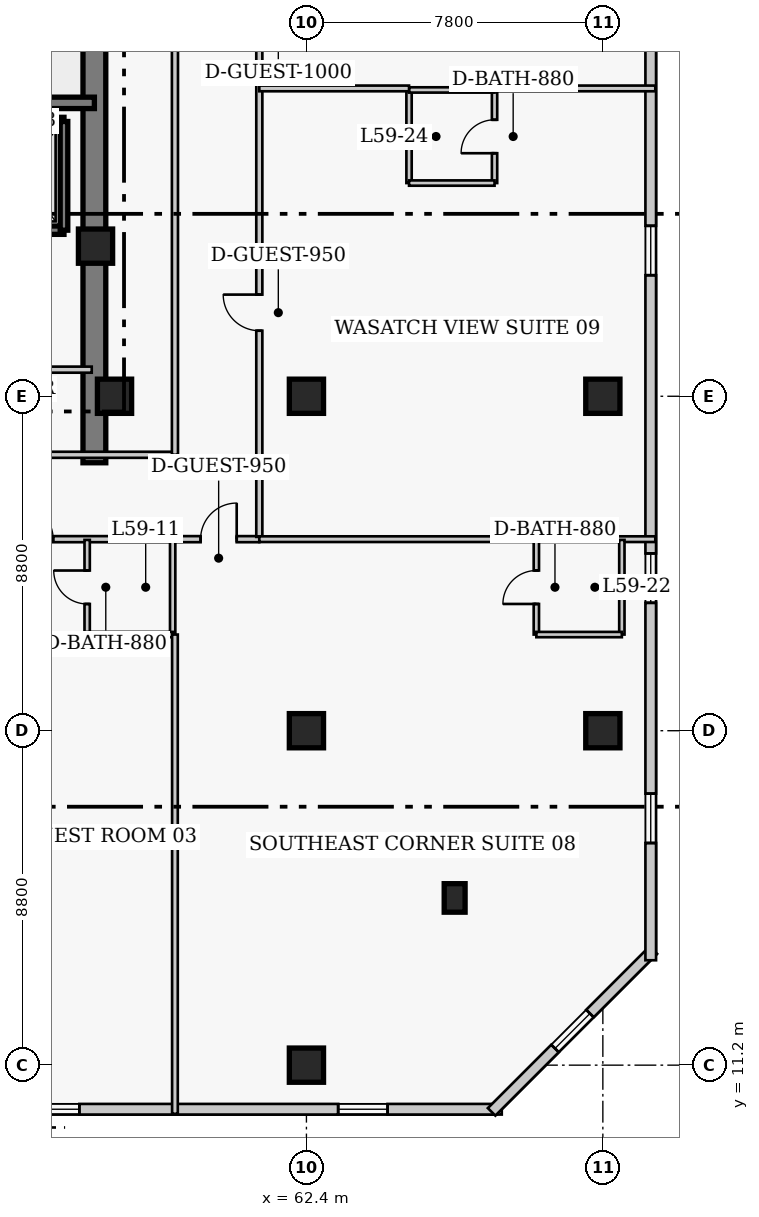
"""IFC4 building model, lengths in metres.
Left out: names, types, materials, properties, quantities, classifications, styles, units other than length and angle.
Written with IfcOpenShell. Run it as: python <this file> out.ifc"""

import sys

from ifc_helpers import new_model, si_unit, direction, frame, frame_2d, origin, origin_2d, place, context, subcontext, project, spatial, rectangle, extrude, element, fill, save


model = new_model("IFC4")
c1 = context("Model", 3, precision=1e-05, world=origin(), true_north=direction((0.0, 1.0)))
c2 = subcontext(c1, "Body", "Model", "MODEL_VIEW")
j1 = project(units=[si_unit("LENGTHUNIT", "METRE"), si_unit("PLANEANGLEUNIT", "RADIAN")], contexts=[c1])
p1 = place(None, origin())
s1 = spatial("IfcSite", under=j1, at=p1, CompositionType="ELEMENT")
p2 = place(p1, origin())
s2 = spatial("IfcBuilding", under=s1, at=p2, CompositionType="ELEMENT")
p3 = place(p2, frame((0.0, 0.0, 236.5)))
s3 = spatial("IfcBuildingStorey", under=s2, at=p3, CompositionType="ELEMENT", Elevation=236.5)
p4 = place(p3, frame((56.82, 27.05, 0.0), z_axis=(0.0, 0.0, 1.0), x_axis=(0.0, 1.0, 0.0)))
e1 = element("IfcWall", 1, at=p4, inside=s3, PredefinedType="SHEAR", context=c2, shape_type="SweptSolid", body=[
    extrude(rectangle(XDim=13.57, YDim=0.6, at=frame_2d((6.785, 0.0))), origin(), (0.0, 0.0, 1.0), 3.9),
])
p5 = place(p3, frame((48.45, 36.52, 0.0), z_axis=(0.0, 0.0, 1.0), x_axis=(1.0, 0.0, 0.0)))
e2 = element("IfcWall", 2, at=p5, inside=s3, PredefinedType="SHEAR", context=c2, shape_type="SweptSolid", body=[
    extrude(rectangle(XDim=8.37, YDim=0.3, at=frame_2d((4.185, 0.0))), origin(), (0.0, 0.0, 1.0), 3.9),
])
for number, where, z_axis, x_axis in (
    (3, (62.4, 11.2, 0.0), (0.0, 0.0, 1.0), (1.0, 0.0, 0.0)),
    (4, (62.4, 20.0, 0.0), (0.0, 0.0, 1.0), (1.0, 0.0, 0.0)),
    (5, (62.4, 28.8, 0.0), (0.0, 0.0, 1.0), (1.0, 0.0, 0.0)),
    (6, (70.2, 20.0, 0.0), (0.0, 0.0, 1.0), (1.0, 0.0, 0.0)),
    (7, (70.2, 28.8, 0.0), (0.0, 0.0, 1.0), (1.0, 0.0, 0.0)),
    (8, (57.35, 28.8, 0.0), (0.0, 0.0, 1.0), (1.0, 0.0, 0.0)),
    (9, (56.85, 32.75, 0.0), (0.0, 0.0, 1.0), (1.0, 0.0, 0.0)),
):
    element("IfcColumn", number, at=place(p3, frame(where, z_axis=z_axis, x_axis=x_axis)), inside=s3, PredefinedType="COLUMN", context=c2, shape_type="SweptSolid", body=[
        extrude(rectangle(XDim=0.9, YDim=0.9, at=origin_2d()), origin(), (0.0, 0.0, 1.0), 3.9),
    ])
p6 = place(p3, frame((66.3, 15.6, 0.0), z_axis=(0.0, 0.0, 1.0), x_axis=(1.0, 0.0, 0.0)))
e10 = element("IfcColumn", 10, at=p6, inside=s3, PredefinedType="PILASTER", context=c2, shape_type="SweptSolid", body=[
    extrude(rectangle(XDim=0.55, YDim=0.75, at=origin_2d()), origin(), (0.0, 0.0, 1.0), 3.9),
])
p7 = place(p3, frame((41.71, 10.04, 0.0), z_axis=(0.0, 0.0, 1.0), x_axis=(1.0, 0.0, 0.0)))
e11 = element("IfcWall", 11, at=p7, inside=s3, PredefinedType="SOLIDWALL", context=c2, shape_type="SweptSolid", body=[
    extrude(rectangle(XDim=25.83, YDim=0.28, at=frame_2d((12.915, 0.0))), origin(), (0.0, 0.0, 1.0), 3.52),
])
p8 = place(p7, frame((3.005, 0.0, 0.85)))
e12 = element("IfcOpeningElement", 12, at=p8, cuts=e11, PredefinedType="OPENING", context=c2, shape_type="SweptSolid", body=[
    extrude(rectangle(XDim=1.3, YDim=1.7, at=frame_2d((0.65, 0.85))), frame((0.0, 0.15, 0.0), z_axis=(0.0, -1.0, 0.0), x_axis=(1.0, 0.0, 0.0)), (0.0, 0.0, 1.0), 0.3),
])
p9 = place(p7, frame((13.415, 0.0, 0.85)))
e13 = element("IfcOpeningElement", 13, at=p9, cuts=e11, PredefinedType="OPENING", context=c2, shape_type="SweptSolid", body=[
    extrude(rectangle(XDim=1.3, YDim=1.7, at=frame_2d((0.65, 0.85))), frame((0.0, 0.15, 0.0), z_axis=(0.0, -1.0, 0.0), x_axis=(1.0, 0.0, 0.0)), (0.0, 0.0, 1.0), 0.3),
])
p10 = place(p7, frame((21.525, 0.0, 0.85)))
e14 = element("IfcOpeningElement", 14, at=p10, cuts=e11, PredefinedType="OPENING", context=c2, shape_type="SweptSolid", body=[
    extrude(rectangle(XDim=1.3, YDim=1.7, at=frame_2d((0.65, 0.85))), frame((0.0, 0.15, 0.0), z_axis=(0.0, -1.0, 0.0), x_axis=(1.0, 0.0, 0.0)), (0.0, 0.0, 1.0), 0.3),
])
p11 = place(p7, frame((8.83, 0.0, 0.85)))
e15 = element("IfcOpeningElement", 15, at=p11, cuts=e11, PredefinedType="OPENING", context=c2, shape_type="SweptSolid", body=[
    extrude(rectangle(XDim=1.3, YDim=1.7, at=frame_2d((0.65, 0.85))), frame((0.0, 0.15, 0.0), z_axis=(0.0, -1.0, 0.0), x_axis=(1.0, 0.0, 0.0)), (0.0, 0.0, 1.0), 0.3),
])
p12 = place(p3, frame((67.273, 9.971, 0.0), z_axis=(0.0, 0.0, 1.0), x_axis=(0.707106781187, 0.707106781187, 0.0)))
e16 = element("IfcWall", 16, at=p12, inside=s3, PredefinedType="SOLIDWALL", context=c2, shape_type="SweptSolid", body=[
    extrude(rectangle(XDim=6.02, YDim=0.28, at=frame_2d((3.01, 0.0))), origin(), (0.0, 0.0, 1.0), 3.52),
])
p13 = place(p12, frame((2.36, 0.0, 0.85)))
e17 = element("IfcOpeningElement", 17, at=p13, cuts=e16, PredefinedType="OPENING", context=c2, shape_type="SweptSolid", body=[
    extrude(rectangle(XDim=1.3, YDim=1.7, at=frame_2d((0.65, 0.85))), frame((0.0, 0.15, 0.0), z_axis=(0.0, -1.0, 0.0), x_axis=(1.0, 0.0, 0.0)), (0.0, 0.0, 1.0), 0.3),
])
p14 = place(p3, frame((71.46, 13.96, 0.0), z_axis=(0.0, 0.0, 1.0), x_axis=(0.0, 1.0, 0.0)))
e18 = element("IfcWall", 18, at=p14, inside=s3, PredefinedType="SOLIDWALL", context=c2, shape_type="SweptSolid", body=[
    extrude(rectangle(XDim=29.88, YDim=0.28, at=frame_2d((14.94, 0.0))), origin(), (0.0, 0.0, 1.0), 3.52),
])
p15 = place(p14, frame((3.085, 0.0, 0.85)))
e19 = element("IfcOpeningElement", 19, at=p15, cuts=e18, PredefinedType="OPENING", context=c2, shape_type="SweptSolid", body=[
    extrude(rectangle(XDim=1.3, YDim=1.7, at=frame_2d((0.65, 0.85))), frame((0.0, 0.15, 0.0), z_axis=(0.0, -1.0, 0.0), x_axis=(1.0, 0.0, 0.0)), (0.0, 0.0, 1.0), 0.3),
])
p16 = place(p14, frame((9.405, 0.0, 0.85)))
e20 = element("IfcOpeningElement", 20, at=p16, cuts=e18, PredefinedType="OPENING", context=c2, shape_type="SweptSolid", body=[
    extrude(rectangle(XDim=1.3, YDim=1.7, at=frame_2d((0.65, 0.85))), frame((0.0, 0.15, 0.0), z_axis=(0.0, -1.0, 0.0), x_axis=(1.0, 0.0, 0.0)), (0.0, 0.0, 1.0), 0.3),
])
p17 = place(p14, frame((18.025, 0.0, 0.85)))
e21 = element("IfcOpeningElement", 21, at=p17, cuts=e18, PredefinedType="OPENING", context=c2, shape_type="SweptSolid", body=[
    extrude(rectangle(XDim=1.3, YDim=1.7, at=frame_2d((0.65, 0.85))), frame((0.0, 0.15, 0.0), z_axis=(0.0, -1.0, 0.0), x_axis=(1.0, 0.0, 0.0)), (0.0, 0.0, 1.0), 0.3),
])
p18 = place(p14, frame((25.495, 0.0, 0.85)))
e22 = element("IfcOpeningElement", 22, at=p18, cuts=e18, PredefinedType="OPENING", context=c2, shape_type="SweptSolid", body=[
    extrude(rectangle(XDim=1.3, YDim=1.7, at=frame_2d((0.65, 0.85))), frame((0.0, 0.15, 0.0), z_axis=(0.0, -1.0, 0.0), x_axis=(1.0, 0.0, 0.0)), (0.0, 0.0, 1.0), 0.3),
])
p19 = place(p3, frame((53.6, 36.03, 0.0), z_axis=(0.0, 0.0, 1.0), x_axis=(1.0, 0.0, 0.0)))
e23 = element("IfcWall", 23, at=p19, inside=s3, PredefinedType="SHEAR", context=c2, shape_type="SweptSolid", body=[
    extrude(rectangle(XDim=2.42, YDim=0.22, at=frame_2d((1.21, 0.0))), origin(), (0.0, 0.0, 1.0), 3.9),
])
p20 = place(p3, frame((53.6, 33.17, 0.0), z_axis=(0.0, 0.0, 1.0), x_axis=(1.0, 0.0, 0.0)))
e24 = element("IfcWall", 24, at=p20, inside=s3, PredefinedType="SHEAR", context=c2, shape_type="SweptSolid", body=[
    extrude(rectangle(XDim=2.42, YDim=0.22, at=frame_2d((1.21, 0.0))), origin(), (0.0, 0.0, 1.0), 3.9),
])
p21 = place(p20, frame((0.65, 0.0, 0.0)))
e25 = element("IfcOpeningElement", 25, at=p21, cuts=e24, PredefinedType="OPENING", context=c2, shape_type="SweptSolid", body=[
    extrude(rectangle(XDim=1.3, YDim=2.15, at=frame_2d((0.65, 1.075))), frame((0.0, 0.12, 0.0), z_axis=(0.0, -1.0, 0.0), x_axis=(1.0, 0.0, 0.0)), (0.0, 0.0, 1.0), 0.24),
])
p22 = place(p3, frame((56.02, 33.17, 0.0), z_axis=(0.0, 0.0, 1.0), x_axis=(0.0, 1.0, 0.0)))
e26 = element("IfcWall", 26, at=p22, inside=s3, PredefinedType="SHEAR", context=c2, shape_type="SweptSolid", body=[
    extrude(rectangle(XDim=2.86, YDim=0.2, at=frame_2d((1.43, 0.0))), origin(), (0.0, 0.0, 1.0), 3.9),
])
p23 = place(p3, frame((51.12, 29.5, 0.0), z_axis=(0.0, 0.0, 1.0), x_axis=(1.0, 0.0, 0.0)))
e27 = element("IfcWall", 27, at=p23, inside=s3, PredefinedType="PARTITIONING", context=c2, shape_type="SweptSolid", body=[
    extrude(rectangle(XDim=5.63, YDim=0.16, at=frame_2d((2.815, 0.0))), origin(), (0.0, 0.0, 1.0), 3.52),
])
p24 = place(p3, frame((50.92, 27.26, 0.0), z_axis=(0.0, 0.0, 1.0), x_axis=(1.0, 0.0, 0.0)))
e28 = element("IfcWall", 28, at=p24, inside=s3, PredefinedType="PARTITIONING", context=c2, shape_type="SweptSolid", body=[
    extrude(rectangle(XDim=8.08, YDim=0.16, at=frame_2d((4.04, 0.0))), origin(), (0.0, 0.0, 1.0), 3.52),
])
p25 = place(p3, frame((35.8, 25.04, 0.0), z_axis=(0.0, 0.0, 1.0), x_axis=(1.0, 0.0, 0.0)))
e29 = element("IfcWall", 29, at=p25, inside=s3, PredefinedType="PARTITIONING", context=c2, shape_type="SweptSolid", body=[
    extrude(rectangle(XDim=25.36, YDim=0.16, at=frame_2d((12.68, 0.0))), origin(), (0.0, 0.0, 1.0), 3.52),
])
p26 = place(p25, frame((1.518, 0.0, 0.0)))
e30 = element("IfcOpeningElement", 30, at=p26, cuts=e29, PredefinedType="OPENING", context=c2, shape_type="SweptSolid", body=[
    extrude(rectangle(XDim=0.95, YDim=2.1, at=frame_2d((0.475, 1.05))), frame((0.0, 0.09, 0.0), z_axis=(0.0, -1.0, 0.0), x_axis=(1.0, 0.0, 0.0)), (0.0, 0.0, 1.0), 0.18),
])
p27 = place(p25, frame((9.278, 0.0, 0.0)))
e31 = element("IfcOpeningElement", 31, at=p27, cuts=e29, PredefinedType="OPENING", context=c2, shape_type="SweptSolid", body=[
    extrude(rectangle(XDim=1.0, YDim=2.15, at=frame_2d((0.5, 1.075))), frame((0.0, 0.09, 0.0), z_axis=(0.0, -1.0, 0.0), x_axis=(1.0, 0.0, 0.0)), (0.0, 0.0, 1.0), 0.18),
])
p28 = place(p25, frame((16.06, 0.0, 0.0)))
e32 = element("IfcOpeningElement", 32, at=p28, cuts=e29, PredefinedType="OPENING", context=c2, shape_type="SweptSolid", body=[
    extrude(rectangle(XDim=0.95, YDim=2.1, at=frame_2d((0.475, 1.05))), frame((0.0, 0.09, 0.0), z_axis=(0.0, -1.0, 0.0), x_axis=(1.0, 0.0, 0.0)), (0.0, 0.0, 1.0), 0.18),
])
p29 = place(p25, frame((18.985, 0.0, 0.0)))
e33 = element("IfcOpeningElement", 33, at=p29, cuts=e29, PredefinedType="OPENING", context=c2, shape_type="SweptSolid", body=[
    extrude(rectangle(XDim=0.95, YDim=2.1, at=frame_2d((0.475, 1.05))), frame((0.0, 0.09, 0.0), z_axis=(0.0, -1.0, 0.0), x_axis=(1.0, 0.0, 0.0)), (0.0, 0.0, 1.0), 0.18),
])
p30 = place(p25, frame((23.815, 0.0, 0.0)))
e34 = element("IfcOpeningElement", 34, at=p30, cuts=e29, PredefinedType="OPENING", context=c2, shape_type="SweptSolid", body=[
    extrude(rectangle(XDim=0.95, YDim=2.1, at=frame_2d((0.475, 1.05))), frame((0.0, 0.09, 0.0), z_axis=(0.0, -1.0, 0.0), x_axis=(1.0, 0.0, 0.0)), (0.0, 0.0, 1.0), 0.18),
])
p31 = place(p3, frame((61.16, 25.1, 0.0), z_axis=(0.0, 0.0, 1.0), x_axis=(0.0, 1.0, 0.0)))
e35 = element("IfcWall", 35, at=p31, inside=s3, PredefinedType="PARTITIONING", context=c2, shape_type="SweptSolid", body=[
    extrude(rectangle(XDim=15.55, YDim=0.16, at=frame_2d((7.775, 0.0))), origin(), (0.0, 0.0, 1.0), 3.52),
])
p32 = place(p31, frame((5.425, 0.0, 0.0)))
e36 = element("IfcOpeningElement", 36, at=p32, cuts=e35, PredefinedType="OPENING", context=c2, shape_type="SweptSolid", body=[
    extrude(rectangle(XDim=0.95, YDim=2.1, at=frame_2d((0.475, 1.05))), frame((0.0, 0.09, 0.0), z_axis=(0.0, -1.0, 0.0), x_axis=(1.0, 0.0, 0.0)), (0.0, 0.0, 1.0), 0.18),
])
p33 = place(p31, frame((14.11, 0.0, 0.0)))
e37 = element("IfcOpeningElement", 37, at=p33, cuts=e35, PredefinedType="OPENING", context=c2, shape_type="SweptSolid", body=[
    extrude(rectangle(XDim=1.0, YDim=2.15, at=frame_2d((0.5, 1.075))), frame((0.0, 0.09, 0.0), z_axis=(0.0, -1.0, 0.0), x_axis=(1.0, 0.0, 0.0)), (0.0, 0.0, 1.0), 0.18),
])
p34 = place(p3, frame((58.94, 27.26, 0.0), z_axis=(0.0, 0.0, 1.0), x_axis=(0.0, 1.0, 0.0)))
e38 = element("IfcWall", 38, at=p34, inside=s3, PredefinedType="PARTITIONING", context=c2, shape_type="SweptSolid", body=[
    extrude(rectangle(XDim=13.39, YDim=0.16, at=frame_2d((6.695, 0.0))), origin(), (0.0, 0.0, 1.0), 3.52),
])
p35 = place(p3, frame((56.63, 22.53, 0.0), z_axis=(0.0, 0.0, 1.0), x_axis=(0.0, 1.0, 0.0)))
e39 = element("IfcWall", 39, at=p35, inside=s3, PredefinedType="PLUMBINGWALL", context=c2, shape_type="SweptSolid", body=[
    extrude(rectangle(XDim=2.49, YDim=0.14, at=frame_2d((1.245, 0.0))), origin(), (0.0, 0.0, 1.0), 3.52),
])
p36 = place(p35, frame((0.805, 0.0, 0.0)))
e40 = element("IfcOpeningElement", 40, at=p36, cuts=e39, PredefinedType="OPENING", context=c2, shape_type="SweptSolid", body=[
    extrude(rectangle(XDim=0.88, YDim=2.05, at=frame_2d((0.44, 1.025))), frame((0.0, 0.08, 0.0), z_axis=(0.0, -1.0, 0.0), x_axis=(1.0, 0.0, 0.0)), (0.0, 0.0, 1.0), 0.16),
])
p37 = place(p3, frame((58.88, 22.53, 0.0), z_axis=(0.0, 0.0, 1.0), x_axis=(0.0, 1.0, 0.0)))
e41 = element("IfcWall", 41, at=p37, inside=s3, PredefinedType="PLUMBINGWALL", context=c2, shape_type="SweptSolid", body=[
    extrude(rectangle(XDim=2.49, YDim=0.14, at=frame_2d((1.245, 0.0))), origin(), (0.0, 0.0, 1.0), 3.52),
])
p38 = place(p3, frame((56.63, 22.53, 0.0), z_axis=(0.0, 0.0, 1.0), x_axis=(1.0, 0.0, 0.0)))
e42 = element("IfcWall", 42, at=p38, inside=s3, PredefinedType="PLUMBINGWALL", context=c2, shape_type="SweptSolid", body=[
    extrude(rectangle(XDim=2.25, YDim=0.14, at=frame_2d((1.125, 0.0))), origin(), (0.0, 0.0, 1.0), 3.52),
])
p39 = place(p3, frame((58.94, 9.92, 0.0), z_axis=(0.0, 0.0, 1.0), x_axis=(0.0, 1.0, 0.0)))
e43 = element("IfcWall", 43, at=p39, inside=s3, PredefinedType="PARTITIONING", context=c2, shape_type="SweptSolid", body=[
    extrude(rectangle(XDim=12.61, YDim=0.15, at=frame_2d((6.305, 0.0))), origin(), (0.0, 0.0, 1.0), 3.52),
])
p40 = place(p3, frame((61.16, 25.04, 0.0), z_axis=(0.0, 0.0, 1.0), x_axis=(1.0, 0.0, 0.0)))
e44 = element("IfcWall", 44, at=p40, inside=s3, PredefinedType="PARTITIONING", context=c2, shape_type="SweptSolid", body=[
    extrude(rectangle(XDim=10.42, YDim=0.15, at=frame_2d((5.21, 0.0))), origin(), (0.0, 0.0, 1.0), 3.52),
])
p41 = place(p3, frame((68.45, 22.53, 0.0), z_axis=(0.0, 0.0, 1.0), x_axis=(0.0, 1.0, 0.0)))
e45 = element("IfcWall", 45, at=p41, inside=s3, PredefinedType="PLUMBINGWALL", context=c2, shape_type="SweptSolid", body=[
    extrude(rectangle(XDim=2.49, YDim=0.14, at=frame_2d((1.245, 0.0))), origin(), (0.0, 0.0, 1.0), 3.52),
])
p42 = place(p41, frame((0.805, 0.0, 0.0)))
e46 = element("IfcOpeningElement", 46, at=p42, cuts=e45, PredefinedType="OPENING", context=c2, shape_type="SweptSolid", body=[
    extrude(rectangle(XDim=0.88, YDim=2.05, at=frame_2d((0.44, 1.025))), frame((0.0, 0.08, 0.0), z_axis=(0.0, -1.0, 0.0), x_axis=(1.0, 0.0, 0.0)), (0.0, 0.0, 1.0), 0.16),
])
p43 = place(p3, frame((70.7, 22.53, 0.0), z_axis=(0.0, 0.0, 1.0), x_axis=(0.0, 1.0, 0.0)))
e47 = element("IfcWall", 47, at=p43, inside=s3, PredefinedType="PLUMBINGWALL", context=c2, shape_type="SweptSolid", body=[
    extrude(rectangle(XDim=2.49, YDim=0.14, at=frame_2d((1.245, 0.0))), origin(), (0.0, 0.0, 1.0), 3.52),
])
p44 = place(p3, frame((68.45, 22.53, 0.0), z_axis=(0.0, 0.0, 1.0), x_axis=(1.0, 0.0, 0.0)))
e48 = element("IfcWall", 48, at=p44, inside=s3, PredefinedType="PLUMBINGWALL", context=c2, shape_type="SweptSolid", body=[
    extrude(rectangle(XDim=2.25, YDim=0.14, at=frame_2d((1.125, 0.0))), origin(), (0.0, 0.0, 1.0), 3.52),
])
p45 = place(p3, frame((65.1, 34.41, 0.0), z_axis=(0.0, 0.0, 1.0), x_axis=(0.0, 1.0, 0.0)))
e49 = element("IfcWall", 49, at=p45, inside=s3, PredefinedType="PLUMBINGWALL", context=c2, shape_type="SweptSolid", body=[
    extrude(rectangle(XDim=2.45, YDim=0.14, at=frame_2d((1.225, 0.0))), origin(), (0.0, 0.0, 1.0), 3.52),
])
p46 = place(p3, frame((67.35, 34.41, 0.0), z_axis=(0.0, 0.0, 1.0), x_axis=(0.0, 1.0, 0.0)))
e50 = element("IfcWall", 50, at=p46, inside=s3, PredefinedType="PLUMBINGWALL", context=c2, shape_type="SweptSolid", body=[
    extrude(rectangle(XDim=2.45, YDim=0.14, at=frame_2d((1.225, 0.0))), origin(), (0.0, 0.0, 1.0), 3.52),
])
p47 = place(p46, frame((0.785, 0.0, 0.0)))
e51 = element("IfcOpeningElement", 51, at=p47, cuts=e50, PredefinedType="OPENING", context=c2, shape_type="SweptSolid", body=[
    extrude(rectangle(XDim=0.88, YDim=2.05, at=frame_2d((0.44, 1.025))), frame((0.0, 0.08, 0.0), z_axis=(0.0, -1.0, 0.0), x_axis=(1.0, 0.0, 0.0)), (0.0, 0.0, 1.0), 0.16),
])
for number, where, z_axis, x_axis in (
    (52, (65.1, 34.41, 0.0), (0.0, 0.0, 1.0), (1.0, 0.0, 0.0)),
    (53, (65.1, 36.86, 0.0), (0.0, 0.0, 1.0), (1.0, 0.0, 0.0)),
):
    element("IfcWall", number, at=place(p3, frame(where, z_axis=z_axis, x_axis=x_axis)), inside=s3, PredefinedType="PLUMBINGWALL", context=c2, shape_type="SweptSolid", body=[
        extrude(rectangle(XDim=2.25, YDim=0.14, at=frame_2d((1.125, 0.0))), origin(), (0.0, 0.0, 1.0), 3.52),
    ])
p48 = place(p3, frame((61.16, 36.9, 0.0), z_axis=(0.0, 0.0, 1.0), x_axis=(1.0, 0.0, 0.0)))
e54 = element("IfcWall", 54, at=p48, inside=s3, PredefinedType="PARTITIONING", context=c2, shape_type="SweptSolid", body=[
    extrude(rectangle(XDim=3.94, YDim=0.15, at=frame_2d((1.97, 0.0))), origin(), (0.0, 0.0, 1.0), 3.52),
])
p49 = place(p3, frame((67.35, 36.9, 0.0), z_axis=(0.0, 0.0, 1.0), x_axis=(1.0, 0.0, 0.0)))
e55 = element("IfcWall", 55, at=p49, inside=s3, PredefinedType="PARTITIONING", context=c2, shape_type="SweptSolid", body=[
    extrude(rectangle(XDim=4.23, YDim=0.15, at=frame_2d((2.115, 0.0))), origin(), (0.0, 0.0, 1.0), 3.52),
])
p50 = place(p9, origin())
e56 = element("IfcWindow", 56, at=p50, inside=s3, PartitioningType="SINGLE_PANEL", PredefinedType="WINDOW", context=c2, shape_type="SweptSolid", body=[
    extrude(rectangle(XDim=1.3, YDim=1.7, at=frame_2d((0.65, 0.85))), frame((0.0, 0.03, 0.0), z_axis=(0.0, -1.0, 0.0), x_axis=(1.0, 0.0, 0.0)), (0.0, 0.0, 1.0), 0.06),
])
fill(e13, e56)
p51 = place(p10, origin())
e57 = element("IfcWindow", 57, at=p51, inside=s3, PartitioningType="SINGLE_PANEL", PredefinedType="WINDOW", context=c2, shape_type="SweptSolid", body=[
    extrude(rectangle(XDim=1.3, YDim=1.7, at=frame_2d((0.65, 0.85))), frame((0.0, 0.03, 0.0), z_axis=(0.0, -1.0, 0.0), x_axis=(1.0, 0.0, 0.0)), (0.0, 0.0, 1.0), 0.06),
])
fill(e14, e57)
p52 = place(p13, origin())
e58 = element("IfcWindow", 58, at=p52, inside=s3, PartitioningType="SINGLE_PANEL", PredefinedType="WINDOW", context=c2, shape_type="SweptSolid", body=[
    extrude(rectangle(XDim=1.3, YDim=1.7, at=frame_2d((0.65, 0.85))), frame((0.0, 0.03, 0.0), z_axis=(0.0, -1.0, 0.0), x_axis=(1.0, 0.0, 0.0)), (0.0, 0.0, 1.0), 0.06),
])
fill(e17, e58)
p53 = place(p15, origin())
e59 = element("IfcWindow", 59, at=p53, inside=s3, PartitioningType="SINGLE_PANEL", PredefinedType="WINDOW", context=c2, shape_type="SweptSolid", body=[
    extrude(rectangle(XDim=1.3, YDim=1.7, at=frame_2d((0.65, 0.85))), frame((0.0, 0.03, 0.0), z_axis=(0.0, -1.0, 0.0), x_axis=(1.0, 0.0, 0.0)), (0.0, 0.0, 1.0), 0.06),
])
fill(e19, e59)
p54 = place(p16, origin())
e60 = element("IfcWindow", 60, at=p54, inside=s3, PartitioningType="SINGLE_PANEL", PredefinedType="WINDOW", context=c2, shape_type="SweptSolid", body=[
    extrude(rectangle(XDim=1.3, YDim=1.7, at=frame_2d((0.65, 0.85))), frame((0.0, 0.03, 0.0), z_axis=(0.0, -1.0, 0.0), x_axis=(1.0, 0.0, 0.0)), (0.0, 0.0, 1.0), 0.06),
])
fill(e20, e60)
p55 = place(p17, origin())
e61 = element("IfcWindow", 61, at=p55, inside=s3, PartitioningType="SINGLE_PANEL", PredefinedType="WINDOW", context=c2, shape_type="SweptSolid", body=[
    extrude(rectangle(XDim=1.3, YDim=1.7, at=frame_2d((0.65, 0.85))), frame((0.0, 0.03, 0.0), z_axis=(0.0, -1.0, 0.0), x_axis=(1.0, 0.0, 0.0)), (0.0, 0.0, 1.0), 0.06),
])
fill(e21, e61)
p56 = place(p36, origin())
e62 = element("IfcDoor", 62, at=p56, inside=s3, OperationType="SINGLE_SWING_RIGHT", PredefinedType="DOOR", context=c2, shape_type="SweptSolid", body=[
    extrude(rectangle(XDim=0.88, YDim=2.05, at=frame_2d((0.44, 1.025))), frame((0.0, 0.025, 0.0), z_axis=(0.0, -1.0, 0.0), x_axis=(1.0, 0.0, 0.0)), (0.0, 0.0, 1.0), 0.05),
])
fill(e40, e62)
p57 = place(p29, origin())
e63 = element("IfcDoor", 63, at=p57, inside=s3, OperationType="SINGLE_SWING_LEFT", PredefinedType="DOOR", context=c2, shape_type="SweptSolid", body=[
    extrude(rectangle(XDim=0.95, YDim=2.1, at=frame_2d((0.475, 1.05))), frame((0.0, 0.025, 0.0), z_axis=(0.0, -1.0, 0.0), x_axis=(1.0, 0.0, 0.0)), (0.0, 0.0, 1.0), 0.05),
])
fill(e33, e63)
p58 = place(p42, origin())
e64 = element("IfcDoor", 64, at=p58, inside=s3, OperationType="SINGLE_SWING_LEFT", PredefinedType="DOOR", context=c2, shape_type="SweptSolid", body=[
    extrude(rectangle(XDim=0.88, YDim=2.05, at=frame_2d((0.44, 1.025))), frame((0.0, 0.025, 0.0), z_axis=(0.0, -1.0, 0.0), x_axis=(1.0, 0.0, 0.0)), (0.0, 0.0, 1.0), 0.05),
])
fill(e46, e64)
p59 = place(p30, origin())
e65 = element("IfcDoor", 65, at=p59, inside=s3, OperationType="SINGLE_SWING_RIGHT", PredefinedType="DOOR", context=c2, shape_type="SweptSolid", body=[
    extrude(rectangle(XDim=0.95, YDim=2.1, at=frame_2d((0.475, 1.05))), frame((0.0, 0.025, 0.0), z_axis=(0.0, -1.0, 0.0), x_axis=(1.0, 0.0, 0.0)), (0.0, 0.0, 1.0), 0.05),
])
fill(e34, e65)
p60 = place(p47, origin())
e66 = element("IfcDoor", 66, at=p60, inside=s3, OperationType="SINGLE_SWING_LEFT", PredefinedType="DOOR", context=c2, shape_type="SweptSolid", body=[
    extrude(rectangle(XDim=0.88, YDim=2.05, at=frame_2d((0.44, 1.025))), frame((0.0, 0.025, 0.0), z_axis=(0.0, -1.0, 0.0), x_axis=(1.0, 0.0, 0.0)), (0.0, 0.0, 1.0), 0.05),
])
fill(e51, e66)
p61 = place(p32, origin())
e67 = element("IfcDoor", 67, at=p61, inside=s3, OperationType="SINGLE_SWING_RIGHT", PredefinedType="DOOR", context=c2, shape_type="SweptSolid", body=[
    extrude(rectangle(XDim=0.95, YDim=2.1, at=frame_2d((0.475, 1.05))), frame((0.0, 0.025, 0.0), z_axis=(0.0, -1.0, 0.0), x_axis=(1.0, 0.0, 0.0)), (0.0, 0.0, 1.0), 0.05),
])
fill(e36, e67)
save(model, sys.argv[1])
